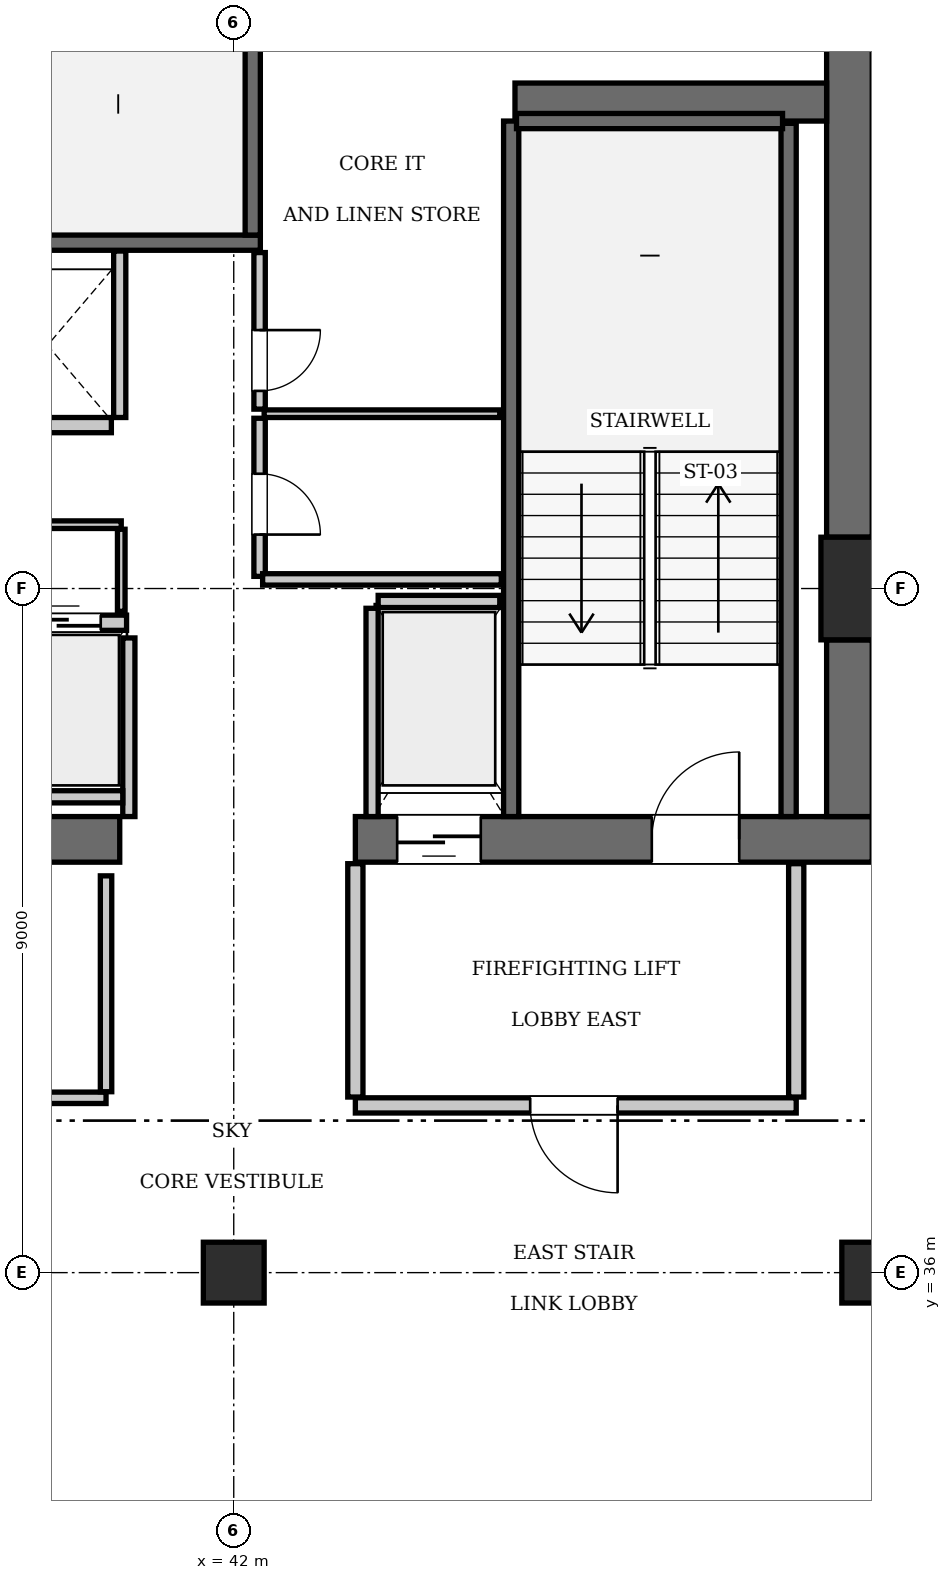
"""IFC4 building model, lengths in metres.
Left out: names, types, materials, properties, quantities, classifications, styles, units other than length and angle.
Written with IfcOpenShell. Run it as: python <this file> out.ifc"""

import sys

from ifc_helpers import new_model, si_unit, direction, frame, frame_2d, origin, origin_2d, place, context, subcontext, project, spatial, rectangle, extrude, element, fill, save


model = new_model("IFC4")
c1 = context("Model", 3, precision=1e-05, world=origin(), true_north=direction((0.0, 1.0)))
c2 = subcontext(c1, "Body", "Model", "MODEL_VIEW")
j1 = project(units=[si_unit("LENGTHUNIT", "METRE"), si_unit("PLANEANGLEUNIT", "RADIAN")], contexts=[c1])
p1 = place(None, origin())
s1 = spatial("IfcSite", under=j1, at=p1, CompositionType="ELEMENT")
p2 = place(p1, origin())
s2 = spatial("IfcBuilding", under=s1, at=p2, CompositionType="ELEMENT")
p3 = place(p2, frame((0.0, 0.0, 329.7)))
s3 = spatial("IfcBuildingStorey", under=s2, at=p3, CompositionType="ELEMENT", Elevation=329.7)
p4 = place(p3, frame((50.4, 45.0, 0.0), z_axis=(0.0, 0.0, 1.0), x_axis=(1.0, 0.0, 0.0)))
e1 = element("IfcColumn", 1, at=p4, inside=s3, PredefinedType="COLUMN", context=c2, shape_type="SweptSolid", body=[
    extrude(rectangle(XDim=1.35, YDim=1.35, at=origin_2d()), origin(), (0.0, 0.0, 1.0), 3.85),
])
p5 = place(p3, frame((35.1, 41.7, 0.0), z_axis=(0.0, 0.0, 1.0), x_axis=(1.0, 0.0, 0.0)))
e2 = element("IfcWall", 2, at=p5, inside=s3, PredefinedType="SHEAR", context=c2, shape_type="SweptSolid", body=[
    extrude(rectangle(XDim=5.4, YDim=0.6, at=frame_2d((2.7, 0.0))), origin(), (0.0, 0.0, 1.0), 3.85),
])
p6 = place(p3, frame((43.6, 41.7, 0.0), z_axis=(0.0, 0.0, 1.0), x_axis=(1.0, 0.0, 0.0)))
e3 = element("IfcWall", 3, at=p6, inside=s3, PredefinedType="SHEAR", context=c2, shape_type="SweptSolid", body=[
    extrude(rectangle(XDim=6.8, YDim=0.6, at=frame_2d((3.4, 0.0))), origin(), (0.0, 0.0, 1.0), 3.85),
])
p7 = place(p6, frame((3.9, 0.0, 0.0)))
e4 = element("IfcOpeningElement", 4, at=p7, cuts=e3, PredefinedType="OPENING", context=c2, shape_type="SweptSolid", body=[
    extrude(rectangle(XDim=1.15, YDim=2.15, at=frame_2d((0.575, 1.075))), frame((0.0, 0.31, 0.0), z_axis=(0.0, -1.0, 0.0), x_axis=(1.0, 0.0, 0.0)), (0.0, 0.0, 1.0), 0.62),
])
p8 = place(p6, frame((0.55, 0.0, 0.0)))
e5 = element("IfcOpeningElement", 5, at=p8, cuts=e3, PredefinedType="OPENING", context=c2, shape_type="SweptSolid", body=[
    extrude(rectangle(XDim=1.1, YDim=2.2, at=frame_2d((0.55, 1.1))), frame((0.0, 0.31, 0.0), z_axis=(0.0, -1.0, 0.0), x_axis=(1.0, 0.0, 0.0)), (0.0, 0.0, 1.0), 0.62),
])
p9 = place(p3, frame((50.1, 42.0, 0.0), z_axis=(0.0, 0.0, 1.0), x_axis=(0.0, 1.0, 0.0)))
e6 = element("IfcWall", 6, at=p9, inside=s3, PredefinedType="SHEAR", context=c2, shape_type="SweptSolid", body=[
    extrude(rectangle(XDim=2.325, YDim=0.6, at=frame_2d((1.163, 0.0))), origin(), (0.0, 0.0, 1.0), 3.85),
])
p10 = place(p3, frame((50.1, 45.675, 0.0), z_axis=(0.0, 0.0, 1.0), x_axis=(0.0, 1.0, 0.0)))
e7 = element("IfcWall", 7, at=p10, inside=s3, PredefinedType="SHEAR", context=c2, shape_type="SweptSolid", body=[
    extrude(rectangle(XDim=7.725, YDim=0.6, at=frame_2d((3.862, 0.0))), origin(), (0.0, 0.0, 1.0), 3.85),
])
p11 = place(p3, frame((45.7, 51.4, 0.0), z_axis=(0.0, 0.0, 1.0), x_axis=(1.0, 0.0, 0.0)))
e8 = element("IfcWall", 8, at=p11, inside=s3, PredefinedType="SHEAR", context=c2, shape_type="SweptSolid", body=[
    extrude(rectangle(XDim=4.1, YDim=0.5, at=frame_2d((2.05, 0.0))), origin(), (0.0, 0.0, 1.0), 3.85),
])
for number, where, z_axis, x_axis in (
    (9, (42.0, 36.0, 0.0), (0.0, 0.0, 1.0), (1.0, 0.0, 0.0)),
    (10, (50.4, 36.0, 0.0), (0.0, 0.0, 1.0), (1.0, 0.0, 0.0)),
):
    element("IfcColumn", number, at=place(p3, frame(where, z_axis=z_axis, x_axis=x_axis)), inside=s3, PredefinedType="COLUMN", context=c2, shape_type="SweptSolid", body=[
        extrude(rectangle(XDim=0.8, YDim=0.8, at=origin_2d()), origin(), (0.0, 0.0, 1.0), 3.85),
    ])
p12 = place(p3, frame((33.25, 49.55, 0.0), z_axis=(0.0, 0.0, 1.0), x_axis=(1.0, 0.0, 0.0)))
e11 = element("IfcWall", 11, at=p12, inside=s3, PredefinedType="SOLIDWALL", context=c2, shape_type="SweptSolid", body=[
    extrude(rectangle(XDim=9.1, YDim=0.2, at=frame_2d((4.55, 0.0))), origin(), (0.0, 0.0, 1.0), 3.61),
])
p13 = place(p3, frame((42.25, 49.65, 0.0), z_axis=(0.0, 0.0, 1.0), x_axis=(0.0, 1.0, 0.0)))
e12 = element("IfcWall", 12, at=p13, inside=s3, PredefinedType="SOLIDWALL", context=c2, shape_type="SweptSolid", body=[
    extrude(rectangle(XDim=3.75, YDim=0.2, at=frame_2d((1.875, 0.0))), origin(), (0.0, 0.0, 1.0), 3.61),
])
p14 = place(p3, frame((45.65, 42.0, 0.0), z_axis=(0.0, 0.0, 1.0), x_axis=(0.0, 1.0, 0.0)))
e13 = element("IfcWall", 13, at=p14, inside=s3, PredefinedType="SOLIDWALL", context=c2, shape_type="SweptSolid", body=[
    extrude(rectangle(XDim=9.15, YDim=0.2, at=frame_2d((4.575, 0.0))), origin(), (0.0, 0.0, 1.0), 3.61),
])
p15 = place(p3, frame((49.3, 42.0, 0.0), z_axis=(0.0, 0.0, 1.0), x_axis=(0.0, 1.0, 0.0)))
e14 = element("IfcWall", 14, at=p15, inside=s3, PredefinedType="SOLIDWALL", context=c2, shape_type="SweptSolid", body=[
    extrude(rectangle(XDim=9.12, YDim=0.2, at=frame_2d((4.56, 0.0))), origin(), (0.0, 0.0, 1.0), 3.61),
])
p16 = place(p3, frame((45.72, 51.15, 0.0), z_axis=(0.0, 0.0, 1.0), x_axis=(1.0, 0.0, 0.0)))
e15 = element("IfcWall", 15, at=p16, inside=s3, PredefinedType="SOLIDWALL", context=c2, shape_type="SweptSolid", body=[
    extrude(rectangle(XDim=3.5, YDim=0.2, at=frame_2d((1.75, 0.0))), origin(), (0.0, 0.0, 1.0), 3.61),
])
p17 = place(p3, frame((38.91, 44.55, 0.0), z_axis=(0.0, 0.0, 1.0), x_axis=(1.0, 0.0, 0.0)))
e16 = element("IfcWall", 16, at=p17, inside=s3, PredefinedType="SOLIDWALL", context=c2, shape_type="SweptSolid", body=[
    extrude(rectangle(XDim=1.68, YDim=0.2, at=frame_2d((0.84, 0.0))), origin(), (0.0, 0.0, 1.0), 3.61),
])
p18 = place(p17, frame((0.34, 0.0, 0.0)))
e17 = element("IfcOpeningElement", 17, at=p18, cuts=e16, PredefinedType="OPENING", context=c2, shape_type="SweptSolid", body=[
    extrude(rectangle(XDim=1.0, YDim=2.15, at=frame_2d((0.5, 1.075))), frame((0.0, 0.11, 0.0), z_axis=(0.0, -1.0, 0.0), x_axis=(1.0, 0.0, 0.0)), (0.0, 0.0, 1.0), 0.22),
])
p19 = place(p3, frame((38.71, 47.15, 0.0), z_axis=(0.0, 0.0, 1.0), x_axis=(1.0, 0.0, 0.0)))
e18 = element("IfcWall", 18, at=p19, inside=s3, PredefinedType="SOLIDWALL", context=c2, shape_type="SweptSolid", body=[
    extrude(rectangle(XDim=1.68, YDim=0.2, at=frame_2d((0.84, 0.0))), origin(), (0.0, 0.0, 1.0), 3.61),
])
p20 = place(p3, frame((43.9, 44.83, 0.0), z_axis=(0.0, 0.0, 1.0), x_axis=(1.0, 0.0, 0.0)))
e19 = element("IfcWall", 19, at=p20, inside=s3, PredefinedType="SOLIDWALL", context=c2, shape_type="SweptSolid", body=[
    extrude(rectangle(XDim=1.6, YDim=0.16, at=frame_2d((0.8, 0.0))), origin(), (0.0, 0.0, 1.0), 3.61),
])
p21 = place(p3, frame((43.82, 42.0, 0.0), z_axis=(0.0, 0.0, 1.0), x_axis=(0.0, 1.0, 0.0)))
e20 = element("IfcWall", 20, at=p21, inside=s3, PredefinedType="SOLIDWALL", context=c2, shape_type="SweptSolid", body=[
    extrude(rectangle(XDim=2.74, YDim=0.16, at=frame_2d((1.37, 0.0))), origin(), (0.0, 0.0, 1.0), 3.61),
])
p22 = place(p3, frame((40.62, 42.0, 0.0), z_axis=(0.0, 0.0, 1.0), x_axis=(0.0, 1.0, 0.0)))
e21 = element("IfcWall", 21, at=p22, inside=s3, PredefinedType="SOLIDWALL", context=c2, shape_type="SweptSolid", body=[
    extrude(rectangle(XDim=2.35, YDim=0.16, at=frame_2d((1.175, 0.0))), origin(), (0.0, 0.0, 1.0), 3.61),
])
p23 = place(p3, frame((35.52, 42.26, 0.0), z_axis=(0.0, 0.0, 1.0), x_axis=(1.0, 0.0, 0.0)))
e22 = element("IfcWall", 22, at=p23, inside=s3, PredefinedType="SOLIDWALL", context=c2, shape_type="SweptSolid", body=[
    extrude(rectangle(XDim=5.02, YDim=0.16, at=frame_2d((2.51, 0.0))), origin(), (0.0, 0.0, 1.0), 3.61),
])
p24 = place(p3, frame((40.5, 47.25, 0.0), z_axis=(0.0, 0.0, 1.0), x_axis=(0.0, 1.0, 0.0)))
e23 = element("IfcWall", 23, at=p24, inside=s3, PredefinedType="SOLIDWALL", context=c2, shape_type="SweptSolid", body=[
    extrude(rectangle(XDim=2.19, YDim=0.16, at=frame_2d((1.095, 0.0))), origin(), (0.0, 0.0, 1.0), 3.61),
])
p25 = place(p3, frame((43.6, 38.2, 0.0), z_axis=(0.0, 0.0, 1.0), x_axis=(1.0, 0.0, 0.0)))
e24 = element("IfcWall", 24, at=p25, inside=s3, PredefinedType="PARTITIONING", context=c2, shape_type="SweptSolid", body=[
    extrude(rectangle(XDim=5.8, YDim=0.2, at=frame_2d((2.9, 0.0))), origin(), (0.0, 0.0, 1.0), 3.61),
])
p26 = place(p25, frame((2.3, 0.0, 0.0)))
e25 = element("IfcOpeningElement", 25, at=p26, cuts=e24, PredefinedType="OPENING", context=c2, shape_type="SweptSolid", body=[
    extrude(rectangle(XDim=1.15, YDim=2.15, at=frame_2d((0.575, 1.075))), frame((0.0, 0.11, 0.0), z_axis=(0.0, -1.0, 0.0), x_axis=(1.0, 0.0, 0.0)), (0.0, 0.0, 1.0), 0.22),
])
for number, where, z_axis, x_axis in (
    (26, (43.6, 38.31, 0.0), (0.0, 0.0, 1.0), (0.0, 1.0, 0.0)),
    (27, (49.4, 38.31, 0.0), (0.0, 0.0, 1.0), (0.0, 1.0, 0.0)),
):
    element("IfcWall", number, at=place(p3, frame(where, z_axis=z_axis, x_axis=x_axis)), inside=s3, PredefinedType="PARTITIONING", context=c2, shape_type="SweptSolid", body=[
        extrude(rectangle(XDim=3.07, YDim=0.2, at=frame_2d((1.535, 0.0))), origin(), (0.0, 0.0, 1.0), 3.61),
    ])
p27 = place(p3, frame((35.58, 45.84, 0.0), z_axis=(0.0, 0.0, 1.0), x_axis=(1.0, 0.0, 0.0)))
e28 = element("IfcWall", 28, at=p27, inside=s3, PredefinedType="PARTITIONING", context=c2, shape_type="SweptSolid", body=[
    extrude(rectangle(XDim=4.94, YDim=0.1, at=frame_2d((2.47, 0.0))), origin(), (0.0, 0.0, 1.0), 3.61),
])
p28 = place(p27, frame((1.8, 0.0, 0.0)))
e29 = element("IfcOpeningElement", 29, at=p28, cuts=e28, PredefinedType="OPENING", context=c2, shape_type="SweptSolid", body=[
    extrude(rectangle(XDim=0.8, YDim=2.05, at=frame_2d((0.4, 1.025))), frame((0.0, 0.06, 0.0), z_axis=(0.0, -1.0, 0.0), x_axis=(1.0, 0.0, 0.0)), (0.0, 0.0, 1.0), 0.12),
])
p29 = place(p3, frame((40.52, 44.7, 0.0), z_axis=(0.0, 0.0, 1.0), x_axis=(0.0, 1.0, 0.0)))
e30 = element("IfcWall", 30, at=p29, inside=s3, PredefinedType="PARTITIONING", context=c2, shape_type="SweptSolid", body=[
    extrude(rectangle(XDim=1.08, YDim=0.1, at=frame_2d((0.54, 0.0))), origin(), (0.0, 0.0, 1.0), 3.61),
])
p30 = place(p3, frame((42.34, 45.16, 0.0), z_axis=(0.0, 0.0, 1.0), x_axis=(0.0, 1.0, 0.0)))
e31 = element("IfcWall", 31, at=p30, inside=s3, PredefinedType="PARTITIONING", context=c2, shape_type="SweptSolid", body=[
    extrude(rectangle(XDim=2.08, YDim=0.15, at=frame_2d((1.04, 0.0))), origin(), (0.0, 0.0, 1.0), 3.61),
])
p31 = place(p30, frame((0.55, 0.0, 0.0)))
e32 = element("IfcOpeningElement", 32, at=p31, cuts=e31, PredefinedType="OPENING", context=c2, shape_type="SweptSolid", body=[
    extrude(rectangle(XDim=0.8, YDim=2.05, at=frame_2d((0.4, 1.025))), frame((0.0, 0.085, 0.0), z_axis=(0.0, -1.0, 0.0), x_axis=(1.0, 0.0, 0.0)), (0.0, 0.0, 1.0), 0.17),
])
p32 = place(p3, frame((42.34, 47.36, 0.0), z_axis=(0.0, 0.0, 1.0), x_axis=(0.0, 1.0, 0.0)))
e33 = element("IfcWall", 33, at=p32, inside=s3, PredefinedType="PARTITIONING", context=c2, shape_type="SweptSolid", body=[
    extrude(rectangle(XDim=2.06, YDim=0.15, at=frame_2d((1.03, 0.0))), origin(), (0.0, 0.0, 1.0), 3.61),
])
p33 = place(p32, frame((0.24, 0.0, 0.0)))
e34 = element("IfcOpeningElement", 34, at=p33, cuts=e33, PredefinedType="OPENING", context=c2, shape_type="SweptSolid", body=[
    extrude(rectangle(XDim=0.8, YDim=2.05, at=frame_2d((0.4, 1.025))), frame((0.0, 0.085, 0.0), z_axis=(0.0, -1.0, 0.0), x_axis=(1.0, 0.0, 0.0)), (0.0, 0.0, 1.0), 0.17),
])
p34 = place(p3, frame((42.4, 47.3, 0.0), z_axis=(0.0, 0.0, 1.0), x_axis=(1.0, 0.0, 0.0)))
e35 = element("IfcWall", 35, at=p34, inside=s3, PredefinedType="PARTITIONING", context=c2, shape_type="SweptSolid", body=[
    extrude(rectangle(XDim=3.1, YDim=0.1, at=frame_2d((1.55, 0.0))), origin(), (0.0, 0.0, 1.0), 3.61),
])
p35 = place(p3, frame((42.38, 45.12, 0.0), z_axis=(0.0, 0.0, 1.0), x_axis=(1.0, 0.0, 0.0)))
e36 = element("IfcWall", 36, at=p35, inside=s3, PredefinedType="PARTITIONING", context=c2, shape_type="SweptSolid", body=[
    extrude(rectangle(XDim=3.14, YDim=0.15, at=frame_2d((1.57, 0.0))), origin(), (0.0, 0.0, 1.0), 3.61),
])
p36 = place(p3, frame((34.4, 38.3, 0.0), z_axis=(0.0, 0.0, 1.0), x_axis=(1.0, 0.0, 0.0)))
e37 = element("IfcWall", 37, at=p36, inside=s3, PredefinedType="PARTITIONING", context=c2, shape_type="SweptSolid", body=[
    extrude(rectangle(XDim=5.92, YDim=0.15, at=frame_2d((2.96, 0.0))), origin(), (0.0, 0.0, 1.0), 3.61),
])
p37 = place(p36, frame((2.4, 0.0, 0.0)))
e38 = element("IfcOpeningElement", 38, at=p37, cuts=e37, PredefinedType="OPENING", context=c2, shape_type="SweptSolid", body=[
    extrude(rectangle(XDim=0.9, YDim=2.1, at=frame_2d((0.45, 1.05))), frame((0.0, 0.085, 0.0), z_axis=(0.0, -1.0, 0.0), x_axis=(1.0, 0.0, 0.0)), (0.0, 0.0, 1.0), 0.17),
])
p38 = place(p3, frame((40.32, 38.38, 0.0), z_axis=(0.0, 0.0, 1.0), x_axis=(0.0, 1.0, 0.0)))
e39 = element("IfcWall", 39, at=p38, inside=s3, PredefinedType="PARTITIONING", context=c2, shape_type="SweptSolid", body=[
    extrude(rectangle(XDim=2.84, YDim=0.15, at=frame_2d((1.42, 0.0))), origin(), (0.0, 0.0, 1.0), 3.61),
])
p39 = place(p7, origin())
e40 = element("IfcDoor", 40, at=p39, inside=s3, OperationType="SINGLE_SWING_RIGHT", PredefinedType="DOOR", context=c2, shape_type="SweptSolid", body=[
    extrude(rectangle(XDim=1.15, YDim=2.15, at=frame_2d((0.575, 1.075))), frame((0.0, 0.025, 0.0), z_axis=(0.0, -1.0, 0.0), x_axis=(1.0, 0.0, 0.0)), (0.0, 0.0, 1.0), 0.05),
])
fill(e4, e40)
p40 = place(p18, origin())
e41 = element("IfcDoor", 41, at=p40, inside=s3, OperationType="SLIDING_TO_LEFT", PredefinedType="DOOR", context=c2, shape_type="SweptSolid", body=[
    extrude(rectangle(XDim=1.0, YDim=2.15, at=frame_2d((0.5, 1.075))), frame((0.0, 0.025, 0.0), z_axis=(0.0, -1.0, 0.0), x_axis=(1.0, 0.0, 0.0)), (0.0, 0.0, 1.0), 0.05),
])
fill(e17, e41)
p41 = place(p8, frame((1.1, 0.0, 0.0), z_axis=(0.0, 0.0, 1.0), x_axis=(-1.0, 0.0, 0.0)))
e42 = element("IfcDoor", 42, at=p41, inside=s3, OperationType="SLIDING_TO_LEFT", PredefinedType="DOOR", context=c2, shape_type="SweptSolid", body=[
    extrude(rectangle(XDim=1.1, YDim=2.2, at=frame_2d((0.55, 1.1))), frame((0.0, 0.025, 0.0), z_axis=(0.0, -1.0, 0.0), x_axis=(1.0, 0.0, 0.0)), (0.0, 0.0, 1.0), 0.05),
])
fill(e5, e42)
p42 = place(p26, frame((1.15, 0.0, 0.0), z_axis=(0.0, 0.0, 1.0), x_axis=(-1.0, 0.0, 0.0)))
e43 = element("IfcDoor", 43, at=p42, inside=s3, OperationType="SINGLE_SWING_LEFT", PredefinedType="DOOR", context=c2, shape_type="SweptSolid", body=[
    extrude(rectangle(XDim=1.15, YDim=2.15, at=frame_2d((0.575, 1.075))), frame((0.0, 0.025, 0.0), z_axis=(0.0, -1.0, 0.0), x_axis=(1.0, 0.0, 0.0)), (0.0, 0.0, 1.0), 0.05),
])
fill(e25, e43)
p43 = place(p31, frame((0.8, 0.0, 0.0), z_axis=(0.0, 0.0, 1.0), x_axis=(-1.0, 0.0, 0.0)))
e44 = element("IfcDoor", 44, at=p43, inside=s3, OperationType="SINGLE_SWING_RIGHT", PredefinedType="DOOR", context=c2, shape_type="SweptSolid", body=[
    extrude(rectangle(XDim=0.8, YDim=2.05, at=frame_2d((0.4, 1.025))), frame((0.0, 0.025, 0.0), z_axis=(0.0, -1.0, 0.0), x_axis=(1.0, 0.0, 0.0)), (0.0, 0.0, 1.0), 0.05),
])
fill(e32, e44)
p44 = place(p33, frame((0.8, 0.0, 0.0), z_axis=(0.0, 0.0, 1.0), x_axis=(-1.0, 0.0, 0.0)))
e45 = element("IfcDoor", 45, at=p44, inside=s3, OperationType="SINGLE_SWING_LEFT", PredefinedType="DOOR", context=c2, shape_type="SweptSolid", body=[
    extrude(rectangle(XDim=0.8, YDim=2.05, at=frame_2d((0.4, 1.025))), frame((0.0, 0.025, 0.0), z_axis=(0.0, -1.0, 0.0), x_axis=(1.0, 0.0, 0.0)), (0.0, 0.0, 1.0), 0.05),
])
fill(e34, e45)
save(model, sys.argv[1])
